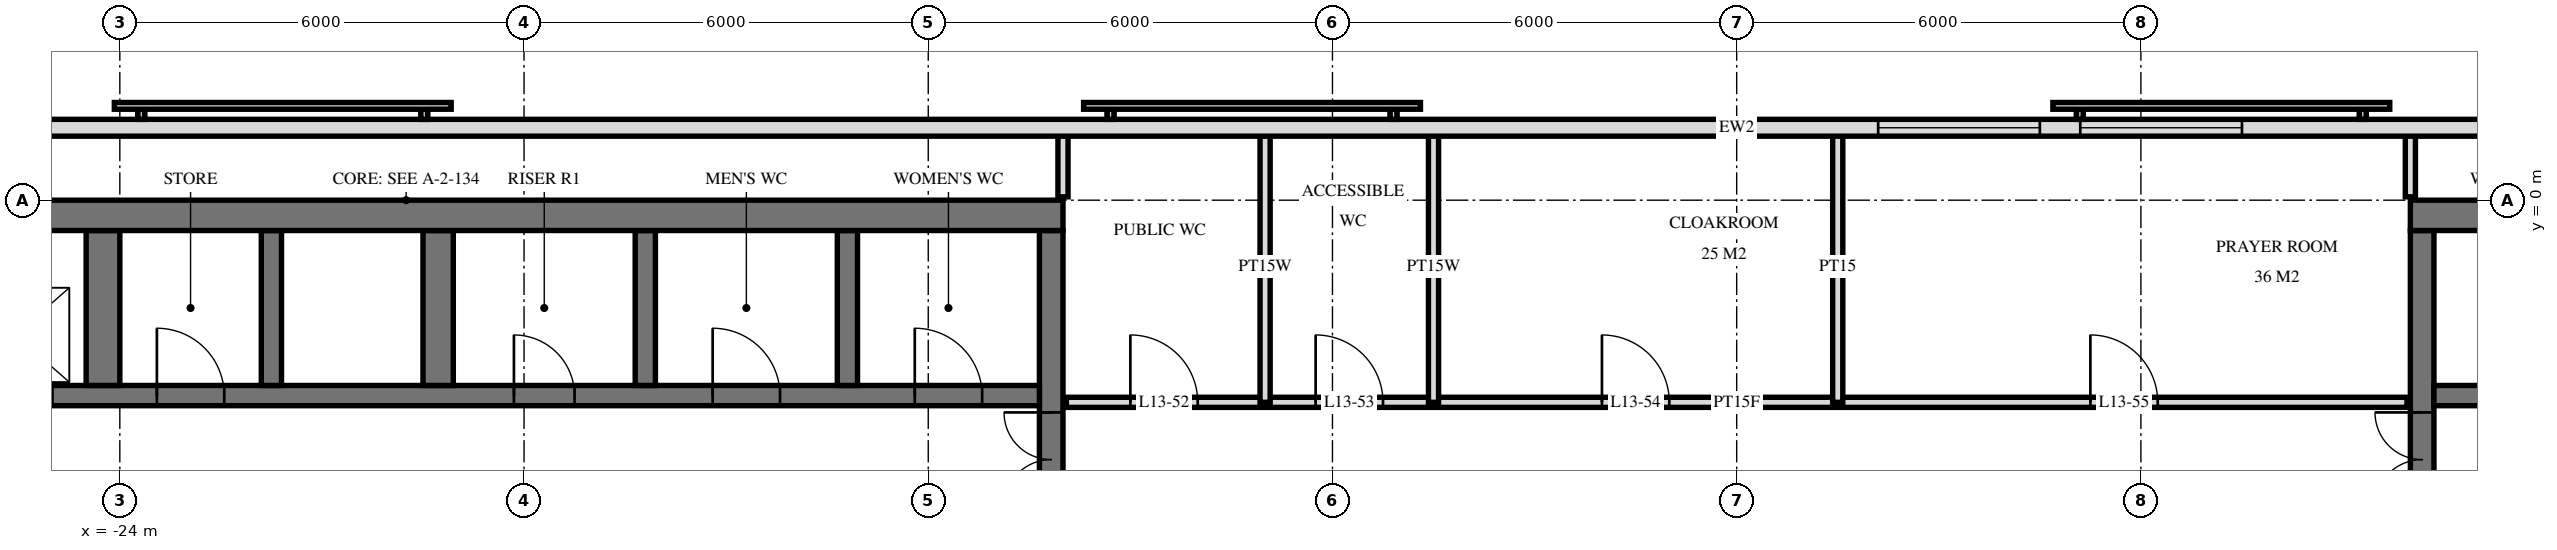
"""IFC4 building model, lengths in metres.
Left out: names, types, materials, properties, quantities, classifications, styles, units other than length and angle.
Written with IfcOpenShell. Run it as: python <this file> out.ifc"""

import sys

from ifc_helpers import new_model, si_unit, direction, frame, frame_2d, origin, place, context, subcontext, project, spatial, rectangle, extrude, element, fill, save


model = new_model("IFC4")
c1 = context("Model", 3, precision=1e-05, world=origin(), true_north=direction((0.0, 1.0)))
c2 = subcontext(c1, "Body", "Model", "MODEL_VIEW")
j1 = project(units=[si_unit("LENGTHUNIT", "METRE"), si_unit("PLANEANGLEUNIT", "RADIAN")], contexts=[c1])
p1 = place(None, origin())
s1 = spatial("IfcSite", under=j1, at=p1, CompositionType="ELEMENT")
p2 = place(p1, origin())
s2 = spatial("IfcBuilding", under=s1, at=p2, CompositionType="ELEMENT")
p3 = place(p2, frame((0.0, 0.0, 56.4)))
s3 = spatial("IfcBuildingStorey", under=s2, at=p3, CompositionType="ELEMENT", Elevation=56.4)
p4 = place(p3, frame((-29.5, -0.225, 0.0), z_axis=(0.0, 0.0, 1.0), x_axis=(1.0, 0.0, 0.0)))
e1 = element("IfcWall", 1, at=p4, inside=s3, PredefinedType="SHEAR", context=c2, shape_type="SweptSolid", body=[
    extrude(rectangle(XDim=19.5, YDim=0.45, at=frame_2d((9.75, 0.0))), origin(), (0.0, 0.0, 1.0), 3.6),
])
p5 = place(p3, frame((-10.175, -14.55, 0.0), z_axis=(0.0, 0.0, 1.0), x_axis=(0.0, 1.0, 0.0)))
e2 = element("IfcWall", 2, at=p5, inside=s3, PredefinedType="SHEAR", context=c2, shape_type="SweptSolid", body=[
    extrude(rectangle(XDim=14.1, YDim=0.35, at=frame_2d((7.05, 0.0))), origin(), (0.0, 0.0, 1.0), 3.6),
])
p6 = place(p5, frame((8.4, 0.0, 0.0)))
e3 = element("IfcOpeningElement", 3, at=p6, cuts=e2, PredefinedType="OPENING", context=c2, shape_type="SweptSolid", body=[
    extrude(rectangle(XDim=1.4, YDim=2.4, at=frame_2d((0.7, 1.2))), frame((0.0, 0.185, 0.0), z_axis=(0.0, -1.0, 0.0), x_axis=(1.0, 0.0, 0.0)), (0.0, 0.0, 1.0), 0.37),
])
p7 = place(p5, frame((10.0, 0.0, 0.0)))
e4 = element("IfcOpeningElement", 4, at=p7, cuts=e2, PredefinedType="OPENING", context=c2, shape_type="SweptSolid", body=[
    extrude(rectangle(XDim=1.4, YDim=2.4, at=frame_2d((0.7, 1.2))), frame((0.0, 0.185, 0.0), z_axis=(0.0, -1.0, 0.0), x_axis=(1.0, 0.0, 0.0)), (0.0, 0.0, 1.0), 0.37),
])
p8 = place(p5, frame((4.0, 0.0, 0.0)))
e5 = element("IfcOpeningElement", 5, at=p8, cuts=e2, PredefinedType="OPENING", context=c2, shape_type="SweptSolid", body=[
    extrude(rectangle(XDim=1.2, YDim=2.1, at=frame_2d((0.6, 1.05))), frame((0.0, 0.185, 0.0), z_axis=(0.0, -1.0, 0.0), x_axis=(1.0, 0.0, 0.0)), (0.0, 0.0, 1.0), 0.37),
])
p9 = place(p3, frame((-29.05, -2.9, 0.0), z_axis=(0.0, 0.0, 1.0), x_axis=(1.0, 0.0, 0.0)))
e6 = element("IfcWall", 6, at=p9, inside=s3, PredefinedType="SHEAR", context=c2, shape_type="SweptSolid", body=[
    extrude(rectangle(XDim=18.7, YDim=0.3, at=frame_2d((9.35, 0.0))), origin(), (0.0, 0.0, 1.0), 3.6),
])
p10 = place(p9, frame((2.95, 0.0, 0.0)))
e7 = element("IfcOpeningElement", 7, at=p10, cuts=e6, PredefinedType="OPENING", context=c2, shape_type="SweptSolid", body=[
    extrude(rectangle(XDim=1.1, YDim=2.1, at=frame_2d((0.55, 1.05))), frame((0.0, 0.16, 0.0), z_axis=(0.0, -1.0, 0.0), x_axis=(1.0, 0.0, 0.0)), (0.0, 0.0, 1.0), 0.32),
])
p11 = place(p9, frame((0.55, 0.0, 0.0)))
e8 = element("IfcOpeningElement", 8, at=p11, cuts=e6, PredefinedType="OPENING", context=c2, shape_type="SweptSolid", body=[
    extrude(rectangle(XDim=1.1, YDim=2.1, at=frame_2d((0.55, 1.05))), frame((0.0, 0.16, 0.0), z_axis=(0.0, -1.0, 0.0), x_axis=(1.0, 0.0, 0.0)), (0.0, 0.0, 1.0), 0.32),
])
p12 = place(p9, frame((10.9, 0.0, 0.0)))
e9 = element("IfcOpeningElement", 9, at=p12, cuts=e6, PredefinedType="OPENING", context=c2, shape_type="SweptSolid", body=[
    extrude(rectangle(XDim=0.9, YDim=2.1, at=frame_2d((0.45, 1.05))), frame((0.0, 0.16, 0.0), z_axis=(0.0, -1.0, 0.0), x_axis=(1.0, 0.0, 0.0)), (0.0, 0.0, 1.0), 0.32),
])
p13 = place(p9, frame((16.85, 0.0, 0.0)))
e10 = element("IfcOpeningElement", 10, at=p13, cuts=e6, PredefinedType="OPENING", context=c2, shape_type="SweptSolid", body=[
    extrude(rectangle(XDim=1.0, YDim=2.1, at=frame_2d((0.5, 1.05))), frame((0.0, 0.16, 0.0), z_axis=(0.0, -1.0, 0.0), x_axis=(1.0, 0.0, 0.0)), (0.0, 0.0, 1.0), 0.32),
])
p14 = place(p9, frame((13.85, 0.0, 0.0)))
e11 = element("IfcOpeningElement", 11, at=p14, cuts=e6, PredefinedType="OPENING", context=c2, shape_type="SweptSolid", body=[
    extrude(rectangle(XDim=1.0, YDim=2.1, at=frame_2d((0.5, 1.05))), frame((0.0, 0.16, 0.0), z_axis=(0.0, -1.0, 0.0), x_axis=(1.0, 0.0, 0.0)), (0.0, 0.0, 1.0), 0.32),
])
p15 = place(p9, frame((5.6, 0.0, 0.0)))
e12 = element("IfcOpeningElement", 12, at=p15, cuts=e6, PredefinedType="OPENING", context=c2, shape_type="SweptSolid", body=[
    extrude(rectangle(XDim=1.0, YDim=2.1, at=frame_2d((0.5, 1.05))), frame((0.0, 0.16, 0.0), z_axis=(0.0, -1.0, 0.0), x_axis=(1.0, 0.0, 0.0)), (0.0, 0.0, 1.0), 0.32),
])
for number, where, z_axis, x_axis in (
    (13, (-13.2, -2.75, 0.0), (0.0, 0.0, 1.0), (0.0, 1.0, 0.0)),
    (14, (-16.2, -2.75, 0.0), (0.0, 0.0, 1.0), (0.0, 1.0, 0.0)),
):
    element("IfcWall", number, at=place(p3, frame(where, z_axis=z_axis, x_axis=x_axis)), inside=s3, PredefinedType="SHEAR", context=c2, shape_type="SweptSolid", body=[
        extrude(rectangle(XDim=2.3, YDim=0.3, at=frame_2d((1.15, 0.0))), origin(), (0.0, 0.0, 1.0), 3.6),
    ])
p16 = place(p3, frame((-19.275, -2.75, 0.0), z_axis=(0.0, 0.0, 1.0), x_axis=(0.0, 1.0, 0.0)))
e15 = element("IfcWall", 15, at=p16, inside=s3, PredefinedType="SHEAR", context=c2, shape_type="SweptSolid", body=[
    extrude(rectangle(XDim=2.3, YDim=0.45, at=frame_2d((1.15, 0.0))), origin(), (0.0, 0.0, 1.0), 3.6),
])
p17 = place(p3, frame((-21.75, -2.75, 0.0), z_axis=(0.0, 0.0, 1.0), x_axis=(0.0, 1.0, 0.0)))
e16 = element("IfcWall", 16, at=p17, inside=s3, PredefinedType="SHEAR", context=c2, shape_type="SweptSolid", body=[
    extrude(rectangle(XDim=2.3, YDim=0.3, at=frame_2d((1.15, 0.0))), origin(), (0.0, 0.0, 1.0), 3.6),
])
p18 = place(p3, frame((-24.25, -2.75, 0.0), z_axis=(0.0, 0.0, 1.0), x_axis=(0.0, 1.0, 0.0)))
e17 = element("IfcWall", 17, at=p18, inside=s3, PredefinedType="SHEAR", context=c2, shape_type="SweptSolid", body=[
    extrude(rectangle(XDim=2.3, YDim=0.5, at=frame_2d((1.15, 0.0))), origin(), (0.0, 0.0, 1.0), 3.6),
])
p19 = place(p3, frame((10.0, -0.225, 0.0), z_axis=(0.0, 0.0, 1.0), x_axis=(1.0, 0.0, 0.0)))
e18 = element("IfcWall", 18, at=p19, inside=s3, PredefinedType="SHEAR", context=c2, shape_type="SweptSolid", body=[
    extrude(rectangle(XDim=19.5, YDim=0.45, at=frame_2d((9.75, 0.0))), origin(), (0.0, 0.0, 1.0), 3.6),
])
p20 = place(p3, frame((10.175, -14.55, 0.0), z_axis=(0.0, 0.0, 1.0), x_axis=(0.0, 1.0, 0.0)))
e19 = element("IfcWall", 19, at=p20, inside=s3, PredefinedType="SHEAR", context=c2, shape_type="SweptSolid", body=[
    extrude(rectangle(XDim=14.1, YDim=0.35, at=frame_2d((7.05, 0.0))), origin(), (0.0, 0.0, 1.0), 3.6),
])
p21 = place(p20, frame((8.4, 0.0, 0.0)))
e20 = element("IfcOpeningElement", 20, at=p21, cuts=e19, PredefinedType="OPENING", context=c2, shape_type="SweptSolid", body=[
    extrude(rectangle(XDim=1.4, YDim=2.4, at=frame_2d((0.7, 1.2))), frame((0.0, 0.185, 0.0), z_axis=(0.0, -1.0, 0.0), x_axis=(1.0, 0.0, 0.0)), (0.0, 0.0, 1.0), 0.37),
])
p22 = place(p20, frame((10.0, 0.0, 0.0)))
e21 = element("IfcOpeningElement", 21, at=p22, cuts=e19, PredefinedType="OPENING", context=c2, shape_type="SweptSolid", body=[
    extrude(rectangle(XDim=1.4, YDim=2.4, at=frame_2d((0.7, 1.2))), frame((0.0, 0.185, 0.0), z_axis=(0.0, -1.0, 0.0), x_axis=(1.0, 0.0, 0.0)), (0.0, 0.0, 1.0), 0.37),
])
p23 = place(p20, frame((4.0, 0.0, 0.0)))
e22 = element("IfcOpeningElement", 22, at=p23, cuts=e19, PredefinedType="OPENING", context=c2, shape_type="SweptSolid", body=[
    extrude(rectangle(XDim=1.2, YDim=2.1, at=frame_2d((0.6, 1.05))), frame((0.0, 0.185, 0.0), z_axis=(0.0, -1.0, 0.0), x_axis=(1.0, 0.0, 0.0)), (0.0, 0.0, 1.0), 0.37),
])
p24 = place(p3, frame((10.35, -2.9, 0.0), z_axis=(0.0, 0.0, 1.0), x_axis=(1.0, 0.0, 0.0)))
e23 = element("IfcWall", 23, at=p24, inside=s3, PredefinedType="SHEAR", context=c2, shape_type="SweptSolid", body=[
    extrude(rectangle(XDim=18.7, YDim=0.3, at=frame_2d((9.35, 0.0))), origin(), (0.0, 0.0, 1.0), 3.6),
])
p25 = place(p24, frame((14.65, 0.0, 0.0)))
e24 = element("IfcOpeningElement", 24, at=p25, cuts=e23, PredefinedType="OPENING", context=c2, shape_type="SweptSolid", body=[
    extrude(rectangle(XDim=1.1, YDim=2.1, at=frame_2d((0.55, 1.05))), frame((0.0, 0.16, 0.0), z_axis=(0.0, -1.0, 0.0), x_axis=(1.0, 0.0, 0.0)), (0.0, 0.0, 1.0), 0.32),
])
p26 = place(p24, frame((17.05, 0.0, 0.0)))
e25 = element("IfcOpeningElement", 25, at=p26, cuts=e23, PredefinedType="OPENING", context=c2, shape_type="SweptSolid", body=[
    extrude(rectangle(XDim=1.1, YDim=2.1, at=frame_2d((0.55, 1.05))), frame((0.0, 0.16, 0.0), z_axis=(0.0, -1.0, 0.0), x_axis=(1.0, 0.0, 0.0)), (0.0, 0.0, 1.0), 0.32),
])
p27 = place(p24, frame((6.9, 0.0, 0.0)))
e26 = element("IfcOpeningElement", 26, at=p27, cuts=e23, PredefinedType="OPENING", context=c2, shape_type="SweptSolid", body=[
    extrude(rectangle(XDim=0.9, YDim=2.1, at=frame_2d((0.45, 1.05))), frame((0.0, 0.16, 0.0), z_axis=(0.0, -1.0, 0.0), x_axis=(1.0, 0.0, 0.0)), (0.0, 0.0, 1.0), 0.32),
])
p28 = place(p24, frame((0.85, 0.0, 0.0)))
e27 = element("IfcOpeningElement", 27, at=p28, cuts=e23, PredefinedType="OPENING", context=c2, shape_type="SweptSolid", body=[
    extrude(rectangle(XDim=1.0, YDim=2.1, at=frame_2d((0.5, 1.05))), frame((0.0, 0.16, 0.0), z_axis=(0.0, -1.0, 0.0), x_axis=(1.0, 0.0, 0.0)), (0.0, 0.0, 1.0), 0.32),
])
p29 = place(p24, frame((3.85, 0.0, 0.0)))
e28 = element("IfcOpeningElement", 28, at=p29, cuts=e23, PredefinedType="OPENING", context=c2, shape_type="SweptSolid", body=[
    extrude(rectangle(XDim=1.0, YDim=2.1, at=frame_2d((0.5, 1.05))), frame((0.0, 0.16, 0.0), z_axis=(0.0, -1.0, 0.0), x_axis=(1.0, 0.0, 0.0)), (0.0, 0.0, 1.0), 0.32),
])
p30 = place(p24, frame((12.1, 0.0, 0.0)))
e29 = element("IfcOpeningElement", 29, at=p30, cuts=e23, PredefinedType="OPENING", context=c2, shape_type="SweptSolid", body=[
    extrude(rectangle(XDim=1.0, YDim=2.1, at=frame_2d((0.5, 1.05))), frame((0.0, 0.16, 0.0), z_axis=(0.0, -1.0, 0.0), x_axis=(1.0, 0.0, 0.0)), (0.0, 0.0, 1.0), 0.32),
])
p31 = place(p3, frame((28.775, 1.075, 0.0), z_axis=(0.0, 0.0, 1.0), x_axis=(-1.0, 0.0, 0.0)))
e30 = element("IfcWall", 30, at=p31, inside=s3, PredefinedType="SOLIDWALL", context=c2, shape_type="SweptSolid", body=[
    extrude(rectangle(XDim=57.551, YDim=0.25, at=frame_2d((28.775, 0.0))), origin(), (0.0, 0.0, 1.0), 3.32),
])
p32 = place(p31, frame((21.275, 0.0, 0.3)))
e31 = element("IfcOpeningElement", 31, at=p32, cuts=e30, PredefinedType="OPENING", context=c2, shape_type="SweptSolid", body=[
    extrude(rectangle(XDim=2.4, YDim=2.1, at=frame_2d((1.2, 1.05))), frame((0.0, 0.135, 0.0), z_axis=(0.0, -1.0, 0.0), x_axis=(1.0, 0.0, 0.0)), (0.0, 0.0, 1.0), 0.27),
])
p33 = place(p31, frame((24.275, 0.0, 0.3)))
e32 = element("IfcOpeningElement", 32, at=p33, cuts=e30, PredefinedType="OPENING", context=c2, shape_type="SweptSolid", body=[
    extrude(rectangle(XDim=2.4, YDim=2.1, at=frame_2d((1.2, 1.05))), frame((0.0, 0.135, 0.0), z_axis=(0.0, -1.0, 0.0), x_axis=(1.0, 0.0, 0.0)), (0.0, 0.0, 1.0), 0.27),
])
p34 = place(p3, frame((10.0, 0.05, 0.0), z_axis=(0.0, 0.0, 1.0), x_axis=(0.0, 1.0, 0.0)))
e33 = element("IfcWall", 33, at=p34, inside=s3, PredefinedType="PARTITIONING", context=c2, shape_type="SweptSolid", body=[
    extrude(rectangle(XDim=0.97, YDim=0.15, at=frame_2d((0.485, 0.0))), origin(), (0.0, 0.0, 1.0), 3.32),
])
p35 = place(p3, frame((1.5, -3.0, 0.0), z_axis=(0.0, 0.0, 1.0), x_axis=(0.0, 1.0, 0.0)))
e34 = element("IfcWall", 34, at=p35, inside=s3, PredefinedType="PARTITIONING", context=c2, shape_type="SweptSolid", body=[
    extrude(rectangle(XDim=4.02, YDim=0.15, at=frame_2d((2.01, 0.0))), origin(), (0.0, 0.0, 1.0), 3.32),
])
for number, where, z_axis, x_axis in (
    (35, (-4.5, -3.0, 0.0), (0.0, 0.0, 1.0), (0.0, 1.0, 0.0)),
    (36, (-7.0, -3.0, 0.0), (0.0, 0.0, 1.0), (0.0, 1.0, 0.0)),
):
    element("IfcWall", number, at=place(p3, frame(where, z_axis=z_axis, x_axis=x_axis)), inside=s3, PredefinedType="PLUMBINGWALL", context=c2, shape_type="SweptSolid", body=[
        extrude(rectangle(XDim=4.02, YDim=0.15, at=frame_2d((2.01, 0.0))), origin(), (0.0, 0.0, 1.0), 3.32),
    ])
p36 = place(p3, frame((-10.0, 0.05, 0.0), z_axis=(0.0, 0.0, 1.0), x_axis=(0.0, 1.0, 0.0)))
e37 = element("IfcWall", 37, at=p36, inside=s3, PredefinedType="PLUMBINGWALL", context=c2, shape_type="SweptSolid", body=[
    extrude(rectangle(XDim=0.97, YDim=0.15, at=frame_2d((0.485, 0.0))), origin(), (0.0, 0.0, 1.0), 3.32),
])
p37 = place(p3, frame((-9.95, -3.0, 0.0), z_axis=(0.0, 0.0, 1.0), x_axis=(1.0, 0.0, 0.0)))
e38 = element("IfcWall", 38, at=p37, inside=s3, PredefinedType="PARTITIONING", context=c2, shape_type="SweptSolid", body=[
    extrude(rectangle(XDim=19.9, YDim=0.15, at=frame_2d((9.95, 0.0))), origin(), (0.0, 0.0, 1.0), 3.32),
])
p38 = place(p37, frame((0.95, 0.0, 0.0)))
e39 = element("IfcOpeningElement", 39, at=p38, cuts=e38, PredefinedType="OPENING", context=c2, shape_type="SweptSolid", body=[
    extrude(rectangle(XDim=1.0, YDim=2.1, at=frame_2d((0.5, 1.05))), frame((0.0, 0.085, 0.0), z_axis=(0.0, -1.0, 0.0), x_axis=(1.0, 0.0, 0.0)), (0.0, 0.0, 1.0), 0.17),
])
p39 = place(p37, frame((3.7, 0.0, 0.0)))
e40 = element("IfcOpeningElement", 40, at=p39, cuts=e38, PredefinedType="OPENING", context=c2, shape_type="SweptSolid", body=[
    extrude(rectangle(XDim=1.0, YDim=2.1, at=frame_2d((0.5, 1.05))), frame((0.0, 0.085, 0.0), z_axis=(0.0, -1.0, 0.0), x_axis=(1.0, 0.0, 0.0)), (0.0, 0.0, 1.0), 0.17),
])
p40 = place(p37, frame((7.95, 0.0, 0.0)))
e41 = element("IfcOpeningElement", 41, at=p40, cuts=e38, PredefinedType="OPENING", context=c2, shape_type="SweptSolid", body=[
    extrude(rectangle(XDim=1.0, YDim=2.1, at=frame_2d((0.5, 1.05))), frame((0.0, 0.085, 0.0), z_axis=(0.0, -1.0, 0.0), x_axis=(1.0, 0.0, 0.0)), (0.0, 0.0, 1.0), 0.17),
])
p41 = place(p37, frame((15.2, 0.0, 0.0)))
e42 = element("IfcOpeningElement", 42, at=p41, cuts=e38, PredefinedType="OPENING", context=c2, shape_type="SweptSolid", body=[
    extrude(rectangle(XDim=1.0, YDim=2.1, at=frame_2d((0.5, 1.05))), frame((0.0, 0.085, 0.0), z_axis=(0.0, -1.0, 0.0), x_axis=(1.0, 0.0, 0.0)), (0.0, 0.0, 1.0), 0.17),
])
p42 = place(p32, origin())
e43 = element("IfcWindow", 43, at=p42, inside=s3, PartitioningType="SINGLE_PANEL", PredefinedType="WINDOW", context=c2, shape_type="SweptSolid", body=[
    extrude(rectangle(XDim=2.4, YDim=2.1, at=frame_2d((1.2, 1.05))), frame((0.0, 0.03, 0.0), z_axis=(0.0, -1.0, 0.0), x_axis=(1.0, 0.0, 0.0)), (0.0, 0.0, 1.0), 0.06),
])
fill(e31, e43)
p43 = place(p33, origin())
e44 = element("IfcWindow", 44, at=p43, inside=s3, PartitioningType="SINGLE_PANEL", PredefinedType="WINDOW", context=c2, shape_type="SweptSolid", body=[
    extrude(rectangle(XDim=2.4, YDim=2.1, at=frame_2d((1.2, 1.05))), frame((0.0, 0.03, 0.0), z_axis=(0.0, -1.0, 0.0), x_axis=(1.0, 0.0, 0.0)), (0.0, 0.0, 1.0), 0.06),
])
fill(e32, e44)
p44 = place(p7, origin())
e45 = element("IfcDoor", 45, at=p44, inside=s3, OperationType="DOUBLE_DOOR_SINGLE_SWING", PredefinedType="DOOR", context=c2, shape_type="SweptSolid", body=[
    extrude(rectangle(XDim=1.4, YDim=2.4, at=frame_2d((0.7, 1.2))), frame((0.0, 0.025, 0.0), z_axis=(0.0, -1.0, 0.0), x_axis=(1.0, 0.0, 0.0)), (0.0, 0.0, 1.0), 0.05),
])
fill(e4, e45)
p45 = place(p12, origin())
e46 = element("IfcDoor", 46, at=p45, inside=s3, OperationType="SINGLE_SWING_RIGHT", PredefinedType="DOOR", context=c2, shape_type="SweptSolid", body=[
    extrude(rectangle(XDim=0.9, YDim=2.1, at=frame_2d((0.45, 1.05))), frame((0.0, 0.025, 0.0), z_axis=(0.0, -1.0, 0.0), x_axis=(1.0, 0.0, 0.0)), (0.0, 0.0, 1.0), 0.05),
])
fill(e9, e46)
p46 = place(p13, origin())
e47 = element("IfcDoor", 47, at=p46, inside=s3, OperationType="SINGLE_SWING_RIGHT", PredefinedType="DOOR", context=c2, shape_type="SweptSolid", body=[
    extrude(rectangle(XDim=1.0, YDim=2.1, at=frame_2d((0.5, 1.05))), frame((0.0, 0.025, 0.0), z_axis=(0.0, -1.0, 0.0), x_axis=(1.0, 0.0, 0.0)), (0.0, 0.0, 1.0), 0.05),
])
fill(e10, e47)
p47 = place(p14, origin())
e48 = element("IfcDoor", 48, at=p47, inside=s3, OperationType="SINGLE_SWING_RIGHT", PredefinedType="DOOR", context=c2, shape_type="SweptSolid", body=[
    extrude(rectangle(XDim=1.0, YDim=2.1, at=frame_2d((0.5, 1.05))), frame((0.0, 0.025, 0.0), z_axis=(0.0, -1.0, 0.0), x_axis=(1.0, 0.0, 0.0)), (0.0, 0.0, 1.0), 0.05),
])
fill(e11, e48)
p48 = place(p15, origin())
e49 = element("IfcDoor", 49, at=p48, inside=s3, OperationType="SINGLE_SWING_RIGHT", PredefinedType="DOOR", context=c2, shape_type="SweptSolid", body=[
    extrude(rectangle(XDim=1.0, YDim=2.1, at=frame_2d((0.5, 1.05))), frame((0.0, 0.025, 0.0), z_axis=(0.0, -1.0, 0.0), x_axis=(1.0, 0.0, 0.0)), (0.0, 0.0, 1.0), 0.05),
])
fill(e12, e49)
p49 = place(p22, origin())
e50 = element("IfcDoor", 50, at=p49, inside=s3, OperationType="DOUBLE_DOOR_SINGLE_SWING", PredefinedType="DOOR", context=c2, shape_type="SweptSolid", body=[
    extrude(rectangle(XDim=1.4, YDim=2.4, at=frame_2d((0.7, 1.2))), frame((0.0, 0.025, 0.0), z_axis=(0.0, -1.0, 0.0), x_axis=(1.0, 0.0, 0.0)), (0.0, 0.0, 1.0), 0.05),
])
fill(e21, e50)
p50 = place(p38, origin())
e51 = element("IfcDoor", 51, at=p50, inside=s3, OperationType="SINGLE_SWING_RIGHT", PredefinedType="DOOR", context=c2, shape_type="SweptSolid", body=[
    extrude(rectangle(XDim=1.0, YDim=2.1, at=frame_2d((0.5, 1.05))), frame((0.0, 0.025, 0.0), z_axis=(0.0, -1.0, 0.0), x_axis=(1.0, 0.0, 0.0)), (0.0, 0.0, 1.0), 0.05),
])
fill(e39, e51)
p51 = place(p39, origin())
e52 = element("IfcDoor", 52, at=p51, inside=s3, OperationType="SINGLE_SWING_RIGHT", PredefinedType="DOOR", context=c2, shape_type="SweptSolid", body=[
    extrude(rectangle(XDim=1.0, YDim=2.1, at=frame_2d((0.5, 1.05))), frame((0.0, 0.025, 0.0), z_axis=(0.0, -1.0, 0.0), x_axis=(1.0, 0.0, 0.0)), (0.0, 0.0, 1.0), 0.05),
])
fill(e40, e52)
p52 = place(p40, origin())
e53 = element("IfcDoor", 53, at=p52, inside=s3, OperationType="SINGLE_SWING_RIGHT", PredefinedType="DOOR", context=c2, shape_type="SweptSolid", body=[
    extrude(rectangle(XDim=1.0, YDim=2.1, at=frame_2d((0.5, 1.05))), frame((0.0, 0.025, 0.0), z_axis=(0.0, -1.0, 0.0), x_axis=(1.0, 0.0, 0.0)), (0.0, 0.0, 1.0), 0.05),
])
fill(e41, e53)
p53 = place(p41, origin())
e54 = element("IfcDoor", 54, at=p53, inside=s3, OperationType="SINGLE_SWING_RIGHT", PredefinedType="DOOR", context=c2, shape_type="SweptSolid", body=[
    extrude(rectangle(XDim=1.0, YDim=2.1, at=frame_2d((0.5, 1.05))), frame((0.0, 0.025, 0.0), z_axis=(0.0, -1.0, 0.0), x_axis=(1.0, 0.0, 0.0)), (0.0, 0.0, 1.0), 0.05),
])
fill(e42, e54)
save(model, sys.argv[1])
